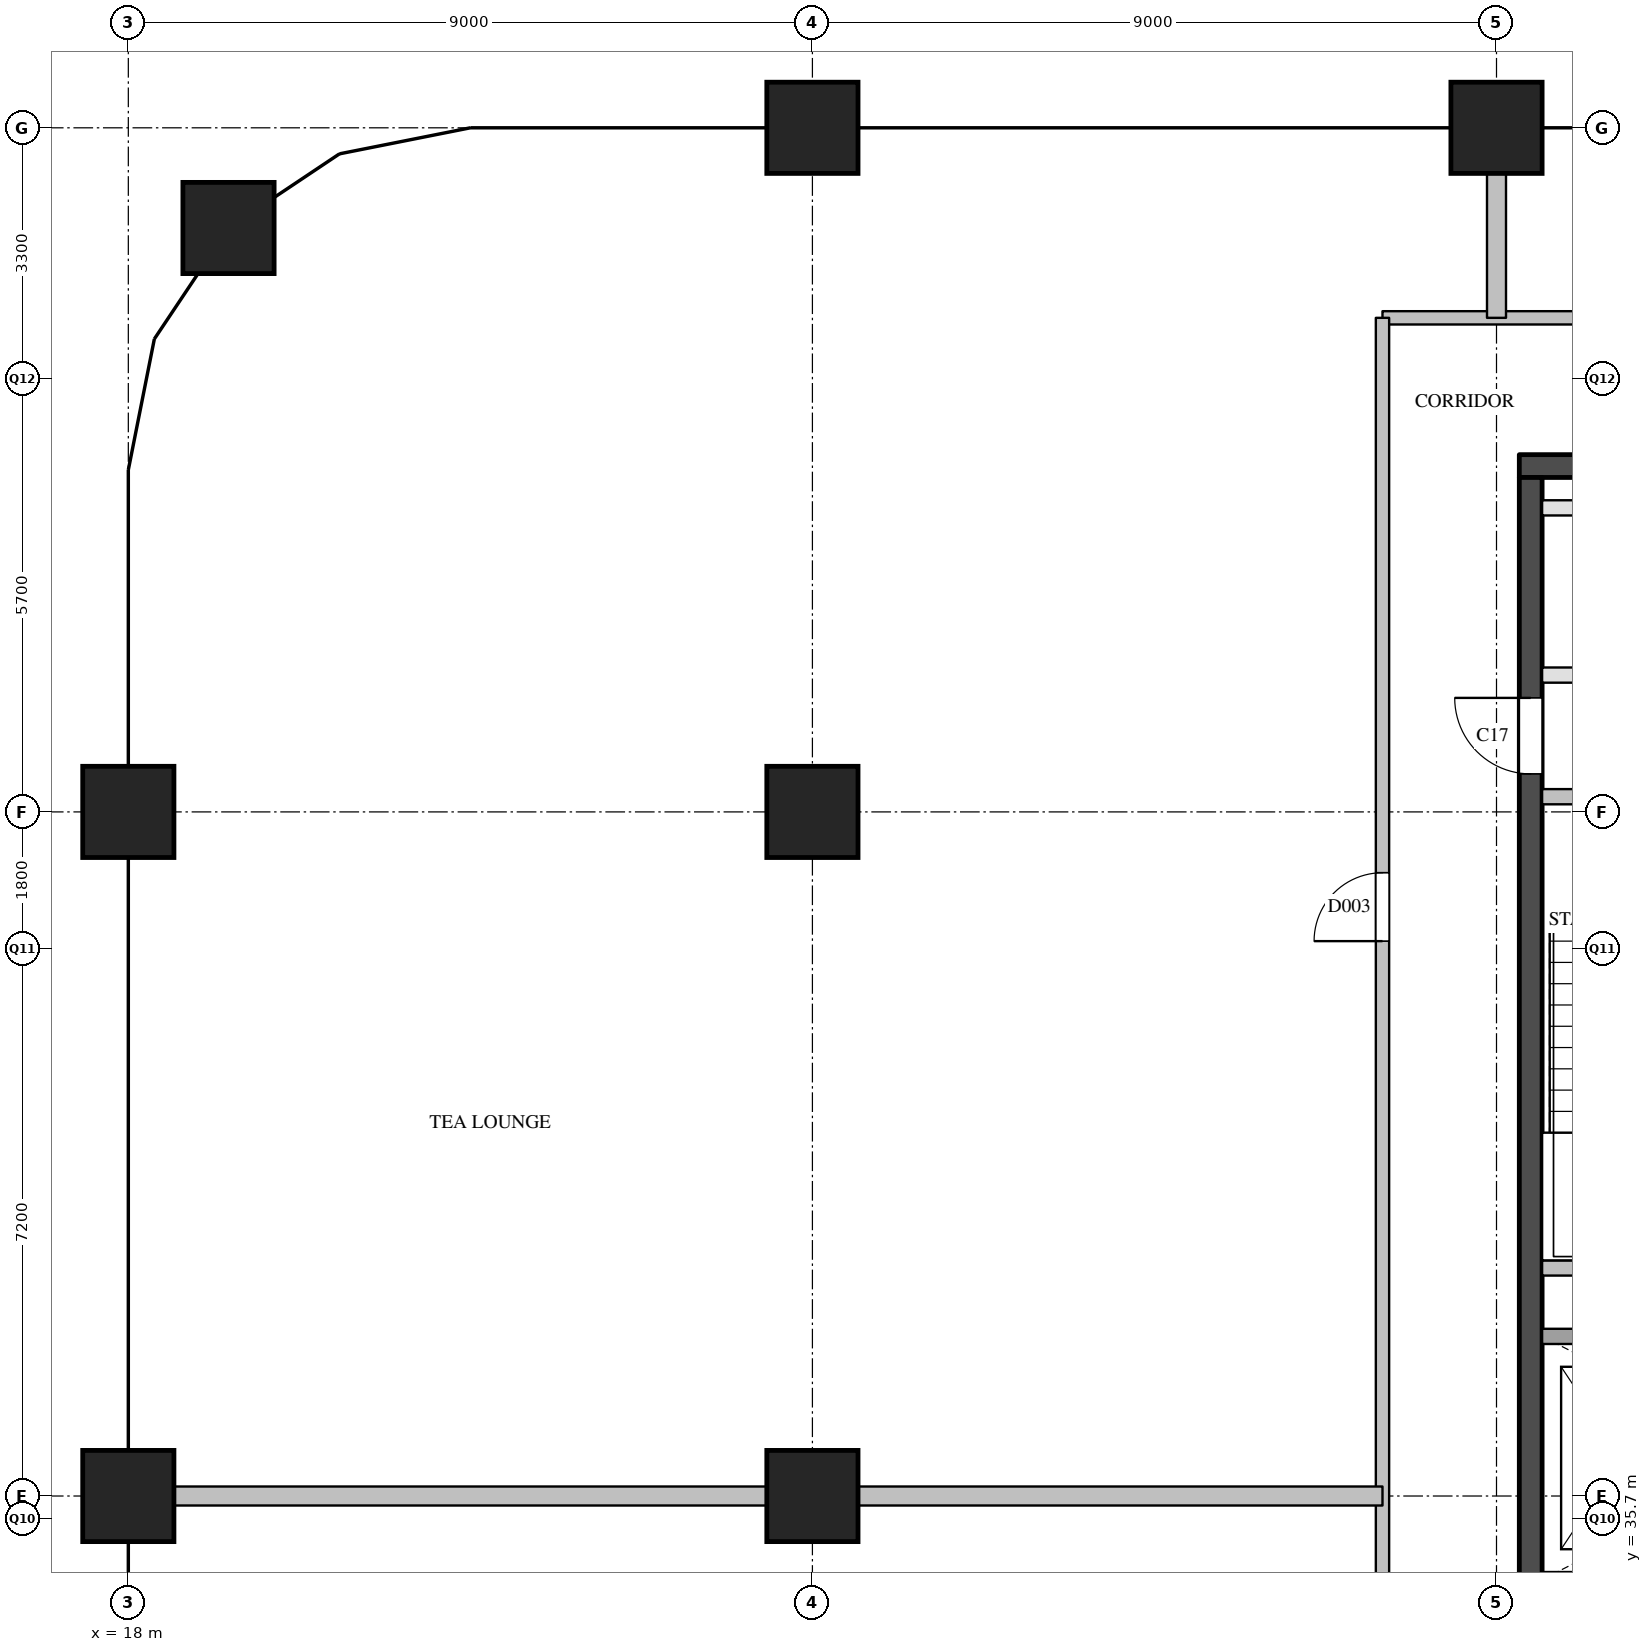
"""IFC4 building model, lengths in metres.
Left out: names, types, materials, properties, quantities, classifications, styles, units other than length and angle.
Written with IfcOpenShell. Run it as: python <this file> out.ifc"""

import sys

from ifc_helpers import new_model, si_unit, direction, frame, frame_2d, origin, origin_2d, place, context, subcontext, project, spatial, rectangle, extrude, element, fill, save


model = new_model("IFC4")
c1 = context("Model", 3, precision=1e-05, world=origin(), true_north=direction((0.0, 1.0)))
c2 = subcontext(c1, "Body", "Model", "MODEL_VIEW")
j1 = project(units=[si_unit("LENGTHUNIT", "METRE"), si_unit("PLANEANGLEUNIT", "RADIAN")], contexts=[c1])
p1 = place(None, origin())
s1 = spatial("IfcSite", under=j1, at=p1, CompositionType="ELEMENT")
p2 = place(p1, origin())
s2 = spatial("IfcBuilding", under=s1, at=p2, CompositionType="ELEMENT")
p3 = place(p2, frame((0.0, 0.0, 312.9)))
s3 = spatial("IfcBuildingStorey", under=s2, at=p3, CompositionType="ELEMENT", Elevation=312.9)
for number, where, z_axis, x_axis in (
    (1, (18.0, 36.0, 0.0), (0.0, 0.0, 1.0), (1.0, 0.0, 0.0)),
    (2, (18.0, 45.0, 0.0), (0.0, 0.0, 1.0), (1.0, 0.0, 0.0)),
    (3, (19.318, 52.682, 0.0), (0.0, 0.0, 1.0), (1.0, 0.0, 0.0)),
    (4, (27.0, 36.0, 0.0), (0.0, 0.0, 1.0), (1.0, 0.0, 0.0)),
    (5, (27.0, 45.0, 0.0), (0.0, 0.0, 1.0), (1.0, 0.0, 0.0)),
    (6, (27.0, 54.0, 0.0), (0.0, 0.0, 1.0), (1.0, 0.0, 0.0)),
    (7, (36.0, 54.0, 0.0), (0.0, 0.0, 1.0), (1.0, 0.0, 0.0)),
):
    element("IfcColumn", number, at=place(p3, frame(where, z_axis=z_axis, x_axis=x_axis)), inside=s3, PredefinedType="COLUMN", context=c2, shape_type="SweptSolid", body=[
        extrude(rectangle(XDim=1.2, YDim=1.2, at=origin_2d()), origin(), (0.0, 0.0, 1.0), 3.9),
    ])
p4 = place(p3, frame((36.3, 49.55, 0.0), z_axis=(0.0, 0.0, 1.0), x_axis=(1.0, 0.0, 0.0)))
e8 = element("IfcWall", 8, at=p4, inside=s3, PredefinedType="SHEAR", context=c2, shape_type="SweptSolid", body=[
    extrude(rectangle(XDim=11.8, YDim=0.3, at=frame_2d((5.9, 0.0))), origin(), (0.0, 0.0, 1.0), 3.6),
])
p5 = place(p3, frame((36.45, 29.1, 0.0), z_axis=(0.0, 0.0, 1.0), x_axis=(0.0, 1.0, 0.0)))
e9 = element("IfcWall", 9, at=p5, inside=s3, PredefinedType="SHEAR", context=c2, shape_type="SweptSolid", body=[
    extrude(rectangle(XDim=20.3, YDim=0.3, at=frame_2d((10.15, 0.0))), origin(), (0.0, 0.0, 1.0), 3.6),
])
p6 = place(p5, frame((3.6, 0.0, 0.0)))
e10 = element("IfcOpeningElement", 10, at=p6, cuts=e9, PredefinedType="OPENING", context=c2, shape_type="SweptSolid", body=[
    extrude(rectangle(XDim=1.8, YDim=2.1, at=frame_2d((0.9, 1.05))), frame((0.0, 0.16, 0.0), z_axis=(0.0, -1.0, 0.0), x_axis=(1.0, 0.0, 0.0)), (0.0, 0.0, 1.0), 0.32),
])
p7 = place(p5, frame((16.4, 0.0, 0.0)))
e11 = element("IfcOpeningElement", 11, at=p7, cuts=e9, PredefinedType="OPENING", context=c2, shape_type="SweptSolid", body=[
    extrude(rectangle(XDim=1.0, YDim=2.1, at=frame_2d((0.5, 1.05))), frame((0.0, 0.16, 0.0), z_axis=(0.0, -1.0, 0.0), x_axis=(1.0, 0.0, 0.0)), (0.0, 0.0, 1.0), 0.32),
])
p8 = place(p3, frame((36.6, 38.1, 0.0), z_axis=(0.0, 0.0, 1.0), x_axis=(1.0, 0.0, 0.0)))
e12 = element("IfcWall", 12, at=p8, inside=s3, PredefinedType="SOLIDWALL", context=c2, shape_type="SweptSolid", body=[
    extrude(rectangle(XDim=6.7, YDim=0.2, at=frame_2d((3.35, 0.0))), origin(), (0.0, 0.0, 1.0), 3.6),
])
p9 = place(p8, frame((0.45, 0.0, 0.0)))
e13 = element("IfcOpeningElement", 13, at=p9, cuts=e12, PredefinedType="OPENING", context=c2, shape_type="SweptSolid", body=[
    extrude(rectangle(XDim=1.2, YDim=2.1, at=frame_2d((0.6, 1.05))), frame((0.0, 0.11, 0.0), z_axis=(0.0, -1.0, 0.0), x_axis=(1.0, 0.0, 0.0)), (0.0, 0.0, 1.0), 0.22),
])
p10 = place(p8, frame((2.55, 0.0, 0.0)))
e14 = element("IfcOpeningElement", 14, at=p10, cuts=e12, PredefinedType="OPENING", context=c2, shape_type="SweptSolid", body=[
    extrude(rectangle(XDim=1.2, YDim=2.1, at=frame_2d((0.6, 1.05))), frame((0.0, 0.11, 0.0), z_axis=(0.0, -1.0, 0.0), x_axis=(1.0, 0.0, 0.0)), (0.0, 0.0, 1.0), 0.22),
])
p11 = place(p8, frame((4.65, 0.0, 0.0)))
e15 = element("IfcOpeningElement", 15, at=p11, cuts=e12, PredefinedType="OPENING", context=c2, shape_type="SweptSolid", body=[
    extrude(rectangle(XDim=1.2, YDim=2.1, at=frame_2d((0.6, 1.05))), frame((0.0, 0.11, 0.0), z_axis=(0.0, -1.0, 0.0), x_axis=(1.0, 0.0, 0.0)), (0.0, 0.0, 1.0), 0.22),
])
p12 = place(p3, frame((36.6, 39.0, 0.0), z_axis=(0.0, 0.0, 1.0), x_axis=(1.0, 0.0, 0.0)))
e16 = element("IfcWall", 16, at=p12, inside=s3, PredefinedType="SOLIDWALL", context=c2, shape_type="SweptSolid", body=[
    extrude(rectangle(XDim=3.25, YDim=0.2, at=frame_2d((1.625, 0.0))), origin(), (0.0, 0.0, 1.0), 3.6),
])
p13 = place(p3, frame((36.6, 45.2, 0.0), z_axis=(0.0, 0.0, 1.0), x_axis=(1.0, 0.0, 0.0)))
e17 = element("IfcWall", 17, at=p13, inside=s3, PredefinedType="SOLIDWALL", context=c2, shape_type="SweptSolid", body=[
    extrude(rectangle(XDim=10.05, YDim=0.2, at=frame_2d((5.025, 0.0))), origin(), (0.0, 0.0, 1.0), 3.6),
])
p14 = place(p13, frame((1.125, 0.0, 0.0)))
e18 = element("IfcOpeningElement", 18, at=p14, cuts=e17, PredefinedType="OPENING", context=c2, shape_type="SweptSolid", body=[
    extrude(rectangle(XDim=1.1, YDim=2.1, at=frame_2d((0.55, 1.05))), frame((0.0, 0.11, 0.0), z_axis=(0.0, -1.0, 0.0), x_axis=(1.0, 0.0, 0.0)), (0.0, 0.0, 1.0), 0.22),
])
p15 = place(p13, frame((4.475, 0.0, 0.0)))
e19 = element("IfcOpeningElement", 19, at=p15, cuts=e17, PredefinedType="OPENING", context=c2, shape_type="SweptSolid", body=[
    extrude(rectangle(XDim=1.1, YDim=2.1, at=frame_2d((0.55, 1.05))), frame((0.0, 0.11, 0.0), z_axis=(0.0, -1.0, 0.0), x_axis=(1.0, 0.0, 0.0)), (0.0, 0.0, 1.0), 0.22),
])
p16 = place(p13, frame((7.825, 0.0, 0.0)))
e20 = element("IfcOpeningElement", 20, at=p16, cuts=e17, PredefinedType="OPENING", context=c2, shape_type="SweptSolid", body=[
    extrude(rectangle(XDim=1.1, YDim=2.1, at=frame_2d((0.55, 1.05))), frame((0.0, 0.11, 0.0), z_axis=(0.0, -1.0, 0.0), x_axis=(1.0, 0.0, 0.0)), (0.0, 0.0, 1.0), 0.22),
])
p17 = place(p3, frame((36.6, 46.8, 0.0), z_axis=(0.0, 0.0, 1.0), x_axis=(1.0, 0.0, 0.0)))
e21 = element("IfcWall", 21, at=p17, inside=s3, PredefinedType="PARTITIONING", context=c2, shape_type="SweptSolid", body=[
    extrude(rectangle(XDim=11.2, YDim=0.2, at=frame_2d((5.6, 0.0))), origin(), (0.0, 0.0, 1.0), 3.6),
])
p18 = place(p17, frame((3.75, 0.0, 0.0)))
e22 = element("IfcOpeningElement", 22, at=p18, cuts=e21, PredefinedType="OPENING", context=c2, shape_type="SweptSolid", body=[
    extrude(rectangle(XDim=0.9, YDim=2.1, at=frame_2d((0.45, 1.05))), frame((0.0, 0.11, 0.0), z_axis=(0.0, -1.0, 0.0), x_axis=(1.0, 0.0, 0.0)), (0.0, 0.0, 1.0), 0.22),
])
p19 = place(p17, frame((9.35, 0.0, 0.0)))
e23 = element("IfcOpeningElement", 23, at=p19, cuts=e21, PredefinedType="OPENING", context=c2, shape_type="SweptSolid", body=[
    extrude(rectangle(XDim=0.9, YDim=2.1, at=frame_2d((0.45, 1.05))), frame((0.0, 0.11, 0.0), z_axis=(0.0, -1.0, 0.0), x_axis=(1.0, 0.0, 0.0)), (0.0, 0.0, 1.0), 0.22),
])
p20 = place(p3, frame((36.6, 49.0, 0.0), z_axis=(0.0, 0.0, 1.0), x_axis=(1.0, 0.0, 0.0)))
e24 = element("IfcWall", 24, at=p20, inside=s3, PredefinedType="PARTITIONING", context=c2, shape_type="SweptSolid", body=[
    extrude(rectangle(XDim=11.2, YDim=0.2, at=frame_2d((5.6, 0.0))), origin(), (0.0, 0.0, 1.0), 3.6),
])
p21 = place(p3, frame((34.5, 51.5, 0.0), z_axis=(0.0, 0.0, 1.0), x_axis=(1.0, 0.0, 0.0)))
e25 = element("IfcWall", 25, at=p21, inside=s3, PredefinedType="PARTITIONING", context=c2, shape_type="SweptSolid", body=[
    extrude(rectangle(XDim=15.4, YDim=0.175, at=frame_2d((7.7, 0.0))), origin(), (0.0, 0.0, 1.0), 3.6),
])
p22 = place(p21, frame((4.6, 0.0, 0.0)))
e26 = element("IfcOpeningElement", 26, at=p22, cuts=e25, PredefinedType="OPENING", context=c2, shape_type="SweptSolid", body=[
    extrude(rectangle(XDim=1.0, YDim=2.1, at=frame_2d((0.5, 1.05))), frame((0.0, 0.097, 0.0), z_axis=(0.0, -1.0, 0.0), x_axis=(1.0, 0.0, 0.0)), (0.0, 0.0, 1.0), 0.195),
])
p23 = place(p3, frame((34.5, 28.5, 0.0), z_axis=(0.0, 0.0, 1.0), x_axis=(0.0, 1.0, 0.0)))
e27 = element("IfcWall", 27, at=p23, inside=s3, PredefinedType="PARTITIONING", context=c2, shape_type="SweptSolid", body=[
    extrude(rectangle(XDim=23.0, YDim=0.175, at=frame_2d((11.5, 0.0))), origin(), (0.0, 0.0, 1.0), 3.6),
])
p24 = place(p23, frame((3.3, 0.0, 0.0)))
e28 = element("IfcOpeningElement", 28, at=p24, cuts=e27, PredefinedType="OPENING", context=c2, shape_type="SweptSolid", body=[
    extrude(rectangle(XDim=0.9, YDim=2.1, at=frame_2d((0.45, 1.05))), frame((0.0, 0.097, 0.0), z_axis=(0.0, -1.0, 0.0), x_axis=(1.0, 0.0, 0.0)), (0.0, 0.0, 1.0), 0.195),
])
p25 = place(p23, frame((14.8, 0.0, 0.0)))
e29 = element("IfcOpeningElement", 29, at=p25, cuts=e27, PredefinedType="OPENING", context=c2, shape_type="SweptSolid", body=[
    extrude(rectangle(XDim=0.9, YDim=2.1, at=frame_2d((0.45, 1.05))), frame((0.0, 0.097, 0.0), z_axis=(0.0, -1.0, 0.0), x_axis=(1.0, 0.0, 0.0)), (0.0, 0.0, 1.0), 0.195),
])
p26 = place(p3, frame((18.0, 36.0, 0.0), z_axis=(0.0, 0.0, 1.0), x_axis=(1.0, 0.0, 0.0)))
e30 = element("IfcWall", 30, at=p26, inside=s3, PredefinedType="PARTITIONING", context=c2, shape_type="SweptSolid", body=[
    extrude(rectangle(XDim=16.5, YDim=0.25, at=frame_2d((8.25, 0.0))), origin(), (0.0, 0.0, 1.0), 3.6),
])
p27 = place(p3, frame((36.0, 51.5, 0.0), z_axis=(0.0, 0.0, 1.0), x_axis=(0.0, 1.0, 0.0)))
e31 = element("IfcWall", 31, at=p27, inside=s3, PredefinedType="PARTITIONING", context=c2, shape_type="SweptSolid", body=[
    extrude(rectangle(XDim=2.5, YDim=0.25, at=frame_2d((1.25, 0.0))), origin(), (0.0, 0.0, 1.0), 3.6),
])
p28 = place(p7, origin())
e32 = element("IfcDoor", 32, at=p28, inside=s3, OperationType="SINGLE_SWING_RIGHT", PredefinedType="DOOR", context=c2, shape_type="SweptSolid", body=[
    extrude(rectangle(XDim=1.0, YDim=2.1, at=frame_2d((0.5, 1.05))), frame((0.0, 0.025, 0.0), z_axis=(0.0, -1.0, 0.0), x_axis=(1.0, 0.0, 0.0)), (0.0, 0.0, 1.0), 0.05),
])
fill(e11, e32)
p29 = place(p25, origin())
e33 = element("IfcDoor", 33, at=p29, inside=s3, OperationType="SINGLE_SWING_LEFT", PredefinedType="DOOR", context=c2, shape_type="SweptSolid", body=[
    extrude(rectangle(XDim=0.9, YDim=2.1, at=frame_2d((0.45, 1.05))), frame((0.0, 0.025, 0.0), z_axis=(0.0, -1.0, 0.0), x_axis=(1.0, 0.0, 0.0)), (0.0, 0.0, 1.0), 0.05),
])
fill(e29, e33)
save(model, sys.argv[1])
